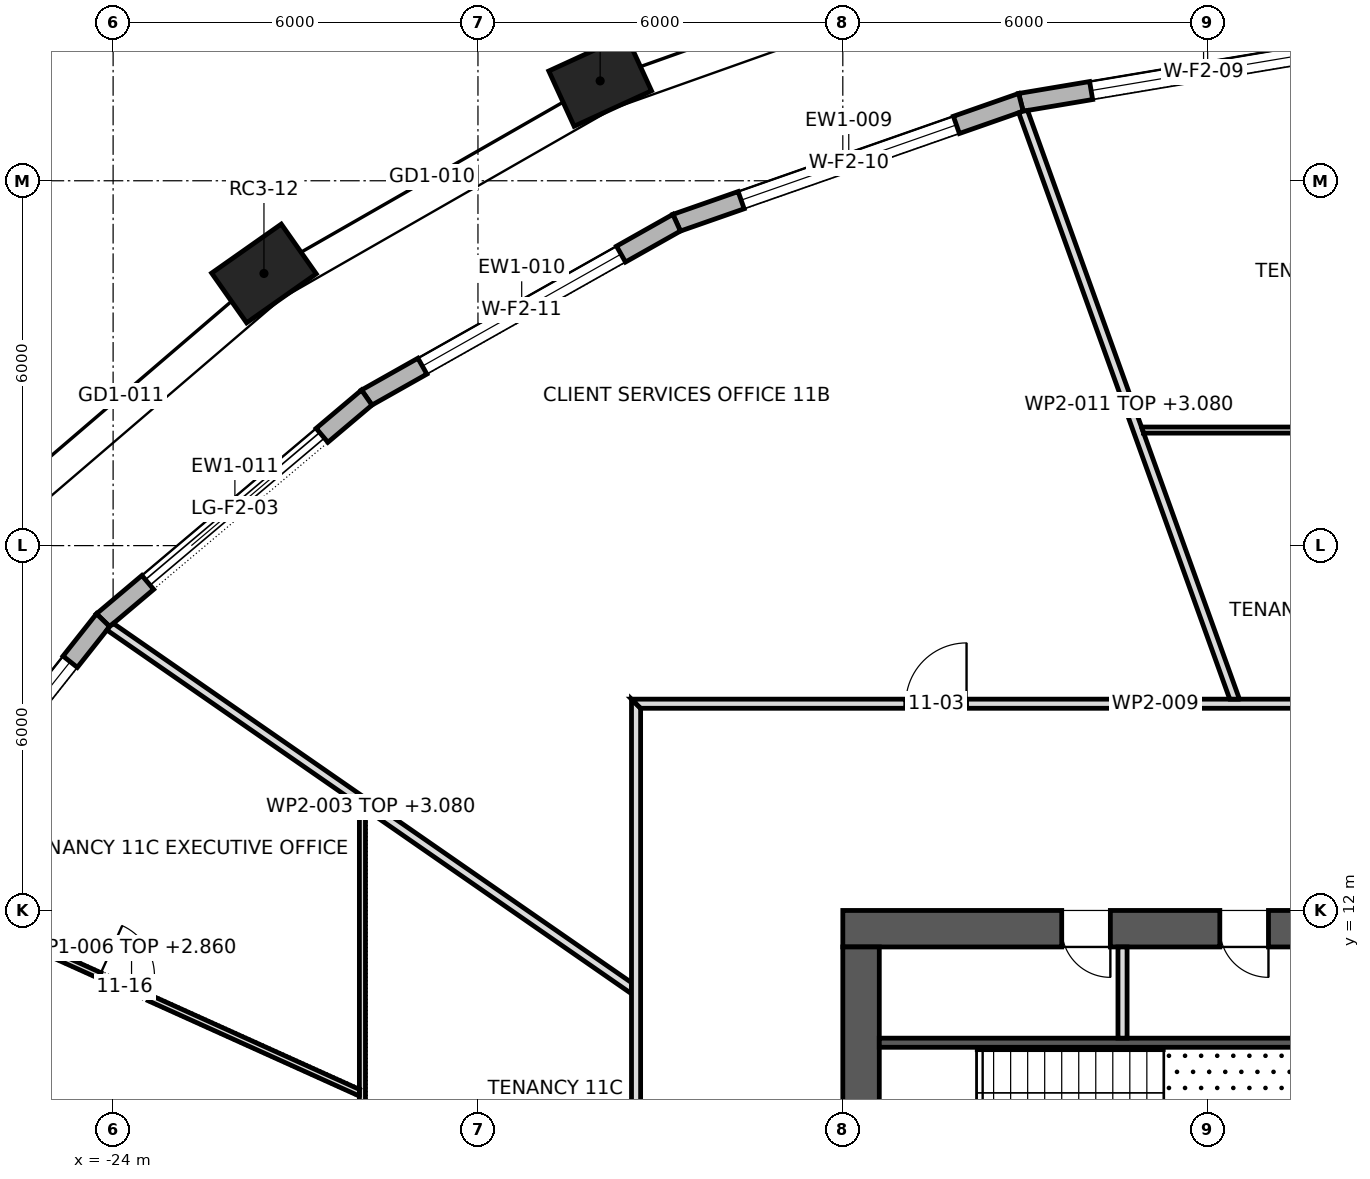
"""IFC4 building model, lengths in metres.
Left out: names, types, materials, properties, quantities, classifications, styles, units other than length and angle.
Written with IfcOpenShell. Run it as: python <this file> out.ifc"""

import sys

from ifc_helpers import new_model, si_unit, direction, frame, frame_2d, origin, origin_2d, place, context, subcontext, project, spatial, polyline, rectangle, outline, extrude, element, fill, save


model = new_model("IFC4")
c1 = context("Model", 3, precision=1e-05, world=origin(), true_north=direction((0.0, 1.0)))
c2 = subcontext(c1, "Body", "Model", "MODEL_VIEW")
j1 = project(units=[si_unit("LENGTHUNIT", "METRE"), si_unit("PLANEANGLEUNIT", "RADIAN")], contexts=[c1])
p1 = place(None, origin())
s1 = spatial("IfcSite", under=j1, at=p1, CompositionType="ELEMENT")
p2 = place(p1, origin())
s2 = spatial("IfcBuilding", under=s1, at=p2, CompositionType="ELEMENT")
p3 = place(p2, frame((0.0, 0.0, 163.3)))
s3 = spatial("IfcBuildingStorey", under=s2, at=p3, CompositionType="ELEMENT", Elevation=163.3)
for number, where, z_axis, x_axis in (
    (1, (-15.99, 25.642, 0.0), (0.0, 0.0, 1.0), (-0.909, -0.417, 0.0)),
    (2, (-21.519, 22.475, 0.0), (0.0, 0.0, 1.0), (-0.818, -0.575, 0.0)),
):
    element("IfcColumn", number, at=place(p3, frame(where, z_axis=z_axis, x_axis=x_axis)), inside=s3, PredefinedType="COLUMN", context=c2, shape_type="SweptSolid", body=[
        extrude(rectangle(XDim=1.4, YDim=1.0, at=origin_2d()), origin(), (0.0, 0.0, 1.0), 4.2),
    ])
p4 = place(p3, frame((-12.0, 11.7, 0.0), z_axis=(0.0, 0.0, 1.0), x_axis=(1.0, 0.0, 0.0)))
e3 = element("IfcWall", 3, at=p4, inside=s3, PredefinedType="SHEAR", context=c2, shape_type="SweptSolid", body=[
    extrude(rectangle(XDim=24.0, YDim=0.6, at=frame_2d((12.0, 0.0))), origin(), (0.0, 0.0, 1.0), 4.2),
])
p5 = place(p4, frame((9.975, 0.0, 0.0)))
e4 = element("IfcOpeningElement", 4, at=p5, cuts=e3, PredefinedType="OPENING", context=c2, shape_type="SweptSolid", body=[
    extrude(rectangle(XDim=0.9, YDim=2.1, at=frame_2d((0.45, 1.05))), frame((0.0, 0.312, 0.0), z_axis=(0.0, -1.0, 0.0), x_axis=(1.0, 0.0, 0.0)), (0.0, 0.0, 1.0), 0.624),
])
p6 = place(p4, frame((3.6, 0.0, 0.0)))
e5 = element("IfcOpeningElement", 5, at=p6, cuts=e3, PredefinedType="OPENING", context=c2, shape_type="SweptSolid", body=[
    extrude(rectangle(XDim=0.8, YDim=2.1, at=frame_2d((0.4, 1.05))), frame((0.0, 0.312, 0.0), z_axis=(0.0, -1.0, 0.0), x_axis=(1.0, 0.0, 0.0)), (0.0, 0.0, 1.0), 0.624),
])
p7 = place(p4, frame((6.2, 0.0, 0.0)))
e6 = element("IfcOpeningElement", 6, at=p7, cuts=e3, PredefinedType="OPENING", context=c2, shape_type="SweptSolid", body=[
    extrude(rectangle(XDim=0.8, YDim=2.1, at=frame_2d((0.4, 1.05))), frame((0.0, 0.312, 0.0), z_axis=(0.0, -1.0, 0.0), x_axis=(1.0, 0.0, 0.0)), (0.0, 0.0, 1.0), 0.624),
])
p8 = place(p4, frame((15.85, 0.0, 0.0)))
e7 = element("IfcOpeningElement", 7, at=p8, cuts=e3, PredefinedType="OPENING", context=c2, shape_type="SweptSolid", body=[
    extrude(rectangle(XDim=0.8, YDim=2.1, at=frame_2d((0.4, 1.05))), frame((0.0, 0.312, 0.0), z_axis=(0.0, -1.0, 0.0), x_axis=(1.0, 0.0, 0.0)), (0.0, 0.0, 1.0), 0.624),
])
p9 = place(p3, frame((-11.7, -11.4, 0.0), z_axis=(0.0, 0.0, 1.0), x_axis=(0.0, 1.0, 0.0)))
e8 = element("IfcWall", 8, at=p9, inside=s3, PredefinedType="SHEAR", context=c2, shape_type="SweptSolid", body=[
    extrude(rectangle(XDim=22.8, YDim=0.6, at=frame_2d((11.4, 0.0))), origin(), (0.0, 0.0, 1.0), 4.2),
])
p10 = place(p9, frame((10.2, 0.0, 0.0)))
e9 = element("IfcOpeningElement", 9, at=p10, cuts=e8, PredefinedType="OPENING", context=c2, shape_type="SweptSolid", body=[
    extrude(rectangle(XDim=2.4, YDim=2.1, at=frame_2d((1.2, 1.05))), frame((0.0, 0.312, 0.0), z_axis=(0.0, -1.0, 0.0), x_axis=(1.0, 0.0, 0.0)), (0.0, 0.0, 1.0), 0.624),
])
p11 = place(p9, frame((18.925, 0.0, 0.0)))
e10 = element("IfcOpeningElement", 10, at=p11, cuts=e8, PredefinedType="OPENING", context=c2, shape_type="SweptSolid", body=[
    extrude(rectangle(XDim=1.2, YDim=2.1, at=frame_2d((0.6, 1.05))), frame((0.0, 0.312, 0.0), z_axis=(0.0, -1.0, 0.0), x_axis=(1.0, 0.0, 0.0)), (0.0, 0.0, 1.0), 0.624),
])
p12 = place(p9, frame((2.675, 0.0, 0.0)))
e11 = element("IfcOpeningElement", 11, at=p12, cuts=e8, PredefinedType="OPENING", context=c2, shape_type="SweptSolid", body=[
    extrude(rectangle(XDim=1.2, YDim=2.1, at=frame_2d((0.6, 1.05))), frame((0.0, 0.312, 0.0), z_axis=(0.0, -1.0, 0.0), x_axis=(1.0, 0.0, 0.0)), (0.0, 0.0, 1.0), 0.624),
])
p13 = place(p3, frame((-3.063, 26.299, 0.0), z_axis=(0.0, 0.0, 1.0), x_axis=(-0.98618955457, -0.165620537547, 0.0)))
e12 = element("IfcWall", 12, at=p13, inside=s3, PredefinedType="STANDARD", context=c2, shape_type="SweptSolid", body=[
    extrude(outline(polyline([(-0.012, -0.15), (6.105, -0.15), (6.08, 0.15), (0.012, 0.15), (-0.012, -0.15)])), origin(), (0.0, 0.0, 1.0), 3.85),
])
p14 = place(p13, frame((1.171, 0.0, 0.6)))
e13 = element("IfcOpeningElement", 13, at=p14, cuts=e12, PredefinedType="OPENING", context=c2, shape_type="SweptSolid", body=[
    extrude(rectangle(XDim=3.75, YDim=2.85, at=frame_2d((1.875, 1.425))), frame((0.0, 0.162, 0.0), z_axis=(0.0, -1.0, 0.0), x_axis=(1.0, 0.0, 0.0)), (0.0, 0.0, 1.0), 0.324),
])
p15 = place(p3, frame((-9.071, 25.29, 0.0), z_axis=(0.0, 0.0, 1.0), x_axis=(-0.943944636678, -0.330103806228, 0.0)))
e14 = element("IfcWall", 14, at=p15, inside=s3, PredefinedType="STANDARD", context=c2, shape_type="SweptSolid", body=[
    extrude(outline(polyline([(-0.013, -0.15), (6.011, -0.15), (5.984, 0.15), (0.013, 0.15), (-0.013, -0.15)])), origin(), (0.0, 0.0, 1.0), 3.85),
])
p16 = place(p15, frame((1.124, 0.0, 0.6)))
e15 = element("IfcOpeningElement", 15, at=p16, cuts=e14, PredefinedType="OPENING", context=c2, shape_type="SweptSolid", body=[
    extrude(rectangle(XDim=3.75, YDim=2.85, at=frame_2d((1.875, 1.425))), frame((0.0, 0.162, 0.0), z_axis=(0.0, -1.0, 0.0), x_axis=(1.0, 0.0, 0.0)), (0.0, 0.0, 1.0), 0.324),
])
p17 = place(p3, frame((-14.732, 23.31, 0.0), z_axis=(0.0, 0.0, 1.0), x_axis=(-0.870982130072, -0.491314694565, 0.0)))
e16 = element("IfcWall", 16, at=p17, inside=s3, PredefinedType="STANDARD", context=c2, shape_type="SweptSolid", body=[
    extrude(outline(polyline([(-0.013, -0.15), (5.866, -0.15), (5.837, 0.15), (0.013, 0.15), (-0.013, -0.15)])), origin(), (0.0, 0.0, 1.0), 3.85),
])
p18 = place(p17, frame((1.051, 0.0, 0.6)))
e17 = element("IfcOpeningElement", 17, at=p18, cuts=e16, PredefinedType="OPENING", context=c2, shape_type="SweptSolid", body=[
    extrude(rectangle(XDim=3.75, YDim=2.85, at=frame_2d((1.875, 1.425))), frame((0.0, 0.162, 0.0), z_axis=(0.0, -1.0, 0.0), x_axis=(1.0, 0.0, 0.0)), (0.0, 0.0, 1.0), 0.324),
])
p19 = place(p3, frame((-19.829, 20.435, 0.0), z_axis=(0.0, 0.0, 1.0), x_axis=(-0.764076096085, -0.645126126732, 0.0)))
e18 = element("IfcWall", 18, at=p19, inside=s3, PredefinedType="STANDARD", context=c2, shape_type="SweptSolid", body=[
    extrude(outline(polyline([(-0.014, -0.15), (5.69, -0.15), (5.66, 0.15), (0.014, 0.15), (-0.014, -0.15)])), origin(), (0.0, 0.0, 1.0), 3.85),
])
p20 = place(p19, frame((0.962, 0.0, 0.0)))
e19 = element("IfcOpeningElement", 19, at=p20, cuts=e18, PredefinedType="OPENING", context=c2, shape_type="SweptSolid", body=[
    extrude(rectangle(XDim=3.75, YDim=3.45, at=frame_2d((1.875, 1.725))), frame((0.0, 0.162, 0.0), z_axis=(0.0, -1.0, 0.0), x_axis=(1.0, 0.0, 0.0)), (0.0, 0.0, 1.0), 0.324),
])
p21 = place(p3, frame((-24.165, 16.774, 0.0), z_axis=(0.0, 0.0, 1.0), x_axis=(-0.620577705153, -0.784144955902, 0.0)))
e20 = element("IfcWall", 20, at=p21, inside=s3, PredefinedType="STANDARD", context=c2, shape_type="SweptSolid", body=[
    extrude(outline(polyline([(-0.015, -0.15), (5.509, -0.15), (5.477, 0.15), (0.015, 0.15), (-0.015, -0.15)])), origin(), (0.0, 0.0, 1.0), 3.85),
])
p22 = place(p21, frame((0.871, 0.0, 0.6)))
e21 = element("IfcOpeningElement", 21, at=p22, cuts=e20, PredefinedType="OPENING", context=c2, shape_type="SweptSolid", body=[
    extrude(rectangle(XDim=3.75, YDim=2.85, at=frame_2d((1.875, 1.425))), frame((0.0, 0.162, 0.0), z_axis=(0.0, -1.0, 0.0), x_axis=(1.0, 0.0, 0.0)), (0.0, 0.0, 1.0), 0.324),
])
p23 = place(p3, frame((-11.4, 9.825, 0.0), z_axis=(0.0, 0.0, 1.0), x_axis=(1.0, 0.0, 0.0)))
e22 = element("IfcWall", 22, at=p23, inside=s3, PredefinedType="SHEAR", context=c2, shape_type="SweptSolid", body=[
    extrude(rectangle(XDim=8.0, YDim=0.15, at=frame_2d((4.0, 0.0))), origin(), (0.0, 0.0, 1.0), 3.85),
])
p24 = place(p3, frame((-7.4, 9.9, 0.0), z_axis=(0.0, 0.0, 1.0), x_axis=(0.0, 1.0, 0.0)))
e23 = element("IfcWall", 23, at=p24, inside=s3, PredefinedType="PARTITIONING", context=c2, shape_type="SweptSolid", body=[
    extrude(rectangle(XDim=1.5, YDim=0.15, at=frame_2d((0.75, 0.0))), origin(), (0.0, 0.0, 1.0), 3.85),
])
p25 = place(p3, frame((-24.059, 16.673, 0.0), z_axis=(0.0, 0.0, 1.0), x_axis=(0.821818585553, -0.569749254006, 0.0)))
e24 = element("IfcWall", 24, at=p25, inside=s3, PredefinedType="PARTITIONING", context=c2, shape_type="SweptSolid", body=[
    extrude(outline(polyline([(0.0, -0.075), (1.724, -0.075), (3.448, -0.075), (5.172, -0.075), (5.173, -0.074), (5.174, -0.075), (6.948, -0.075), (8.723, -0.075), (10.497, -0.075), (10.497, -0.074), (10.394, 0.075), (8.666, 0.075), (6.938, 0.075), (5.209, 0.075), (3.481, 0.075), (1.753, 0.075), (0.025, 0.075), (0.004, -0.002), (0.0, -0.072), (0.0, -0.075)])), origin(), (0.0, 0.0, 1.0), 3.08),
])
p26 = place(p3, frame((-19.9, 1.726, 0.0), z_axis=(0.0, 0.0, 1.0), x_axis=(0.0, 1.0, 0.0)))
e25 = element("IfcWall", 25, at=p26, inside=s3, PredefinedType="PARTITIONING", context=c2, shape_type="SweptSolid", body=[
    extrude(outline(polyline([(0.0, -0.05), (1.99, -0.05), (3.979, -0.05), (5.969, -0.05), (7.959, -0.05), (9.948, -0.05), (11.938, -0.05), (12.007, 0.049), (12.007, 0.05), (10.448, 0.05), (8.89, 0.05), (7.332, 0.05), (7.331, 0.048), (7.326, 0.05), (5.497, 0.05), (3.667, 0.05), (1.838, 0.05), (0.008, 0.05), (0.0, -0.047), (0.0, -0.05)])), origin(), (0.0, 0.0, 1.0), 3.85),
])
p27 = place(p26, frame((3.139, 0.0, 0.0)))
e26 = element("IfcOpeningElement", 26, at=p27, cuts=e25, PredefinedType="OPENING", context=c2, shape_type="SweptSolid", body=[
    extrude(rectangle(XDim=0.9, YDim=2.1, at=frame_2d((0.45, 1.05))), frame((0.0, 0.062, 0.0), z_axis=(0.0, -1.0, 0.0), x_axis=(1.0, 0.0, 0.0)), (0.0, 0.0, 1.0), 0.124),
])
p28 = place(p3, frame((-19.93, 8.993, 0.0), z_axis=(0.0, 0.0, 1.0), x_axis=(-0.911442933079, 0.411426518033, 0.0)))
e27 = element("IfcWall", 27, at=p28, inside=s3, PredefinedType="PARTITIONING", context=c2, shape_type="SweptSolid", body=[
    extrude(outline(polyline([(0.045, -0.05), (1.683, -0.05), (3.321, -0.05), (4.958, -0.05), (6.596, -0.05), (8.234, -0.05), (8.247, 0.0), (8.248, 0.046), (8.248, 0.05), (6.599, 0.05), (4.949, 0.05), (3.299, 0.05), (1.65, 0.05), (0.0, 0.05), (0.0, 0.049), (0.045, -0.05)])), origin(), (0.0, 0.0, 1.0), 2.86),
])
p29 = place(p28, frame((3.807, 0.0, 0.0)))
e28 = element("IfcOpeningElement", 28, at=p29, cuts=e27, PredefinedType="OPENING", context=c2, shape_type="SweptSolid", body=[
    extrude(rectangle(XDim=0.9, YDim=2.1, at=frame_2d((0.45, 1.05))), frame((0.0, 0.062, 0.0), z_axis=(0.0, -1.0, 0.0), x_axis=(1.0, 0.0, 0.0)), (0.0, 0.0, 1.0), 0.124),
])
p30 = place(p3, frame((-15.4, -15.475, 0.0), z_axis=(0.0, 0.0, 1.0), x_axis=(0.0, 1.0, 0.0)))
e29 = element("IfcWall", 29, at=p30, inside=s3, PredefinedType="PARTITIONING", context=c2, shape_type="SweptSolid", body=[
    extrude(outline(polyline([(0.15, -0.075), (2.066, -0.075), (3.981, -0.075), (5.897, -0.075), (7.812, -0.075), (9.728, -0.075), (11.644, -0.075), (13.56, -0.075), (15.475, -0.075), (17.391, -0.075), (19.306, -0.075), (21.222, -0.075), (23.138, -0.075), (25.053, -0.075), (26.969, -0.075), (28.885, -0.075), (30.8, -0.075), (30.95, 0.075), (29.016, 0.075), (27.081, 0.075), (25.147, 0.075), (23.212, 0.075), (21.278, 0.075), (19.344, 0.075), (17.409, 0.075), (15.475, 0.075), (13.541, 0.075), (11.606, 0.075), (9.672, 0.075), (7.738, 0.075), (5.803, 0.075), (3.869, 0.075), (1.935, 0.075), (0.0, 0.075), (0.15, -0.075)])), origin(), (0.0, 0.0, 1.0), 3.85),
])
p31 = place(p30, frame((20.95, 0.0, 0.0)))
e30 = element("IfcOpeningElement", 30, at=p31, cuts=e29, PredefinedType="OPENING", context=c2, shape_type="SweptSolid", body=[
    extrude(rectangle(XDim=1.0, YDim=2.1, at=frame_2d((0.5, 1.05))), frame((0.0, 0.087, 0.0), z_axis=(0.0, -1.0, 0.0), x_axis=(1.0, 0.0, 0.0)), (0.0, 0.0, 1.0), 0.174),
])
p32 = place(p30, frame((13.645, 0.0, 0.0)))
e31 = element("IfcOpeningElement", 31, at=p32, cuts=e29, PredefinedType="OPENING", context=c2, shape_type="SweptSolid", body=[
    extrude(rectangle(XDim=1.0, YDim=2.1, at=frame_2d((0.5, 1.05))), frame((0.0, 0.087, 0.0), z_axis=(0.0, -1.0, 0.0), x_axis=(1.0, 0.0, 0.0)), (0.0, 0.0, 1.0), 0.174),
])
p33 = place(p30, frame((4.905, 0.0, 0.0)))
e32 = element("IfcOpeningElement", 32, at=p33, cuts=e29, PredefinedType="OPENING", context=c2, shape_type="SweptSolid", body=[
    extrude(rectangle(XDim=1.8, YDim=2.1, at=frame_2d((0.9, 1.05))), frame((0.0, 0.087, 0.0), z_axis=(0.0, -1.0, 0.0), x_axis=(1.0, 0.0, 0.0)), (0.0, 0.0, 1.0), 0.174),
])
p34 = place(p3, frame((-15.475, 15.4, 0.0), z_axis=(0.0, 0.0, 1.0), x_axis=(1.0, 0.0, 0.0)))
e33 = element("IfcWall", 33, at=p34, inside=s3, PredefinedType="PARTITIONING", context=c2, shape_type="SweptSolid", body=[
    extrude(outline(polyline([(17.155, 0.075), (15.249, 0.075), (13.343, 0.075), (11.437, 0.075), (9.531, 0.075), (7.625, 0.075), (5.719, 0.075), (3.812, 0.075), (1.906, 0.075), (0.0, 0.075), (0.15, -0.075), (2.04, -0.075), (3.929, -0.075), (5.818, -0.075), (7.708, -0.075), (9.597, -0.075), (11.487, -0.075), (13.376, -0.075), (15.266, -0.075), (17.155, -0.075), (17.155, 0.075)])), origin(), (0.0, 0.0, 1.0), 3.85),
])
p35 = place(p34, frame((13.05, 0.0, 0.0)))
e34 = element("IfcOpeningElement", 34, at=p35, cuts=e33, PredefinedType="OPENING", context=c2, shape_type="SweptSolid", body=[
    extrude(rectangle(XDim=1.0, YDim=2.1, at=frame_2d((0.5, 1.05))), frame((0.0, 0.087, 0.0), z_axis=(0.0, -1.0, 0.0), x_axis=(1.0, 0.0, 0.0)), (0.0, 0.0, 1.0), 0.174),
])
p36 = place(p34, frame((4.51, 0.0, 0.0)))
e35 = element("IfcOpeningElement", 35, at=p36, cuts=e33, PredefinedType="OPENING", context=c2, shape_type="SweptSolid", body=[
    extrude(rectangle(XDim=1.0, YDim=2.1, at=frame_2d((0.5, 1.05))), frame((0.0, 0.087, 0.0), z_axis=(0.0, -1.0, 0.0), x_axis=(1.0, 0.0, 0.0)), (0.0, 0.0, 1.0), 0.174),
])
p37 = place(p3, frame((-9.037, 25.143, 0.0), z_axis=(0.0, 0.0, 1.0), x_axis=(0.338668278724, -0.940905838533, 0.0)))
e36 = element("IfcWall", 36, at=p37, inside=s3, PredefinedType="PARTITIONING", context=c2, shape_type="SweptSolid", body=[
    extrude(outline(polyline([(0.0, -0.075), (1.708, -0.075), (3.416, -0.075), (5.124, -0.075), (6.832, -0.075), (8.541, -0.075), (10.249, -0.075), (10.3, 0.069), (10.3, 0.069), (10.302, 0.074), (10.302, 0.075), (8.752, 0.075), (7.203, 0.075), (5.653, 0.075), (5.653, 0.074), (5.651, 0.075), (3.772, 0.075), (1.893, 0.075), (0.014, 0.075), (0.0, 0.003), (0.0, -0.054), (0.0, -0.075)])), origin(), (0.0, 0.0, 1.0), 3.08),
])
p38 = place(p3, frame((-7.087, 19.9, 0.0), z_axis=(0.0, 0.0, 1.0), x_axis=(1.0, 0.0, 0.0)))
e37 = element("IfcWall", 37, at=p38, inside=s3, PredefinedType="PARTITIONING", context=c2, shape_type="SweptSolid", body=[
    extrude(outline(polyline([(0.036, -0.05), (1.772, -0.05), (3.508, -0.05), (5.245, -0.05), (6.981, -0.05), (8.717, -0.05), (8.717, -0.05), (8.817, -0.05), (8.817, -0.05), (10.591, -0.05), (12.365, -0.05), (14.139, -0.05), (14.175, 0.049), (14.175, 0.05), (12.604, 0.05), (11.034, 0.05), (9.464, 0.05), (9.464, 0.049), (9.454, 0.05), (7.563, 0.05), (5.672, 0.05), (3.781, 0.05), (1.891, 0.05), (0.0, 0.05), (0.0, 0.049), (0.036, -0.05)])), origin(), (0.0, 0.0, 1.0), 3.85),
])
p39 = place(p38, frame((3.903, 0.0, 0.0)))
e38 = element("IfcOpeningElement", 38, at=p39, cuts=e37, PredefinedType="OPENING", context=c2, shape_type="SweptSolid", body=[
    extrude(rectangle(XDim=0.9, YDim=2.1, at=frame_2d((0.45, 1.05))), frame((0.0, 0.062, 0.0), z_axis=(0.0, -1.0, 0.0), x_axis=(1.0, 0.0, 0.0)), (0.0, 0.0, 1.0), 0.124),
])
p40 = place(p38, frame((11.373, 0.0, 0.0)))
e39 = element("IfcOpeningElement", 39, at=p40, cuts=e37, PredefinedType="OPENING", context=c2, shape_type="SweptSolid", body=[
    extrude(rectangle(XDim=0.9, YDim=2.1, at=frame_2d((0.45, 1.05))), frame((0.0, 0.062, 0.0), z_axis=(0.0, -1.0, 0.0), x_axis=(1.0, 0.0, 0.0)), (0.0, 0.0, 1.0), 0.124),
])
p41 = place(p14, origin())
e40 = element("IfcWindow", 40, at=p41, inside=s3, PartitioningType="TRIPLE_PANEL_VERTICAL", PredefinedType="WINDOW", context=c2, shape_type="SweptSolid", body=[
    extrude(rectangle(XDim=3.75, YDim=2.85, at=frame_2d((1.875, 1.425))), frame((0.0, 0.03, 0.0), z_axis=(0.0, -1.0, 0.0), x_axis=(1.0, 0.0, 0.0)), (0.0, 0.0, 1.0), 0.06),
])
fill(e13, e40)
p42 = place(p16, origin())
e41 = element("IfcWindow", 41, at=p42, inside=s3, PartitioningType="TRIPLE_PANEL_VERTICAL", PredefinedType="WINDOW", context=c2, shape_type="SweptSolid", body=[
    extrude(rectangle(XDim=3.75, YDim=2.85, at=frame_2d((1.875, 1.425))), frame((0.0, 0.03, 0.0), z_axis=(0.0, -1.0, 0.0), x_axis=(1.0, 0.0, 0.0)), (0.0, 0.0, 1.0), 0.06),
])
fill(e15, e41)
p43 = place(p18, origin())
e42 = element("IfcWindow", 42, at=p43, inside=s3, PartitioningType="TRIPLE_PANEL_VERTICAL", PredefinedType="WINDOW", context=c2, shape_type="SweptSolid", body=[
    extrude(rectangle(XDim=3.75, YDim=2.85, at=frame_2d((1.875, 1.425))), frame((0.0, 0.03, 0.0), z_axis=(0.0, -1.0, 0.0), x_axis=(1.0, 0.0, 0.0)), (0.0, 0.0, 1.0), 0.06),
])
fill(e17, e42)
p44 = place(p20, origin())
e43 = element("IfcDoor", 43, at=p44, inside=s3, OperationType="DOUBLE_DOOR_SLIDING", PredefinedType="DOOR", context=c2, shape_type="SweptSolid", body=[
    extrude(rectangle(XDim=3.75, YDim=3.45, at=frame_2d((1.875, 1.725))), frame((0.0, 0.025, 0.0), z_axis=(0.0, -1.0, 0.0), x_axis=(1.0, 0.0, 0.0)), (0.0, 0.0, 1.0), 0.05),
])
fill(e19, e43)
p45 = place(p22, origin())
e44 = element("IfcWindow", 44, at=p45, inside=s3, PartitioningType="TRIPLE_PANEL_VERTICAL", PredefinedType="WINDOW", context=c2, shape_type="SweptSolid", body=[
    extrude(rectangle(XDim=3.75, YDim=2.85, at=frame_2d((1.875, 1.425))), frame((0.0, 0.03, 0.0), z_axis=(0.0, -1.0, 0.0), x_axis=(1.0, 0.0, 0.0)), (0.0, 0.0, 1.0), 0.06),
])
fill(e21, e44)
p46 = place(p6, frame((0.8, 0.0, 0.0), z_axis=(0.0, 0.0, 1.0), x_axis=(-1.0, 0.0, 0.0)))
e45 = element("IfcDoor", 45, at=p46, inside=s3, OperationType="SINGLE_SWING_RIGHT", PredefinedType="DOOR", context=c2, shape_type="SweptSolid", body=[
    extrude(rectangle(XDim=0.8, YDim=2.1, at=frame_2d((0.4, 1.05))), frame((0.0, 0.025, 0.0), z_axis=(0.0, -1.0, 0.0), x_axis=(1.0, 0.0, 0.0)), (0.0, 0.0, 1.0), 0.05),
])
fill(e5, e45)
p47 = place(p7, frame((0.8, 0.0, 0.0), z_axis=(0.0, 0.0, 1.0), x_axis=(-1.0, 0.0, 0.0)))
e46 = element("IfcDoor", 46, at=p47, inside=s3, OperationType="SINGLE_SWING_RIGHT", PredefinedType="DOOR", context=c2, shape_type="SweptSolid", body=[
    extrude(rectangle(XDim=0.8, YDim=2.1, at=frame_2d((0.4, 1.05))), frame((0.0, 0.025, 0.0), z_axis=(0.0, -1.0, 0.0), x_axis=(1.0, 0.0, 0.0)), (0.0, 0.0, 1.0), 0.05),
])
fill(e6, e46)
p48 = place(p36, origin())
e47 = element("IfcDoor", 47, at=p48, inside=s3, OperationType="SINGLE_SWING_LEFT", PredefinedType="DOOR", context=c2, shape_type="SweptSolid", body=[
    extrude(rectangle(XDim=1.0, YDim=2.1, at=frame_2d((0.5, 1.05))), frame((0.0, 0.025, 0.0), z_axis=(0.0, -1.0, 0.0), x_axis=(1.0, 0.0, 0.0)), (0.0, 0.0, 1.0), 0.05),
])
fill(e35, e47)
p49 = place(p29, frame((0.9, 0.0, 0.0), z_axis=(0.0, 0.0, 1.0), x_axis=(-1.0, 0.0, 0.0)))
e48 = element("IfcDoor", 48, at=p49, inside=s3, OperationType="SINGLE_SWING_RIGHT", PredefinedType="DOOR", context=c2, shape_type="SweptSolid", body=[
    extrude(rectangle(XDim=0.9, YDim=2.1, at=frame_2d((0.45, 1.05))), frame((0.0, 0.025, 0.0), z_axis=(0.0, -1.0, 0.0), x_axis=(1.0, 0.0, 0.0)), (0.0, 0.0, 1.0), 0.05),
])
fill(e28, e48)
save(model, sys.argv[1])
